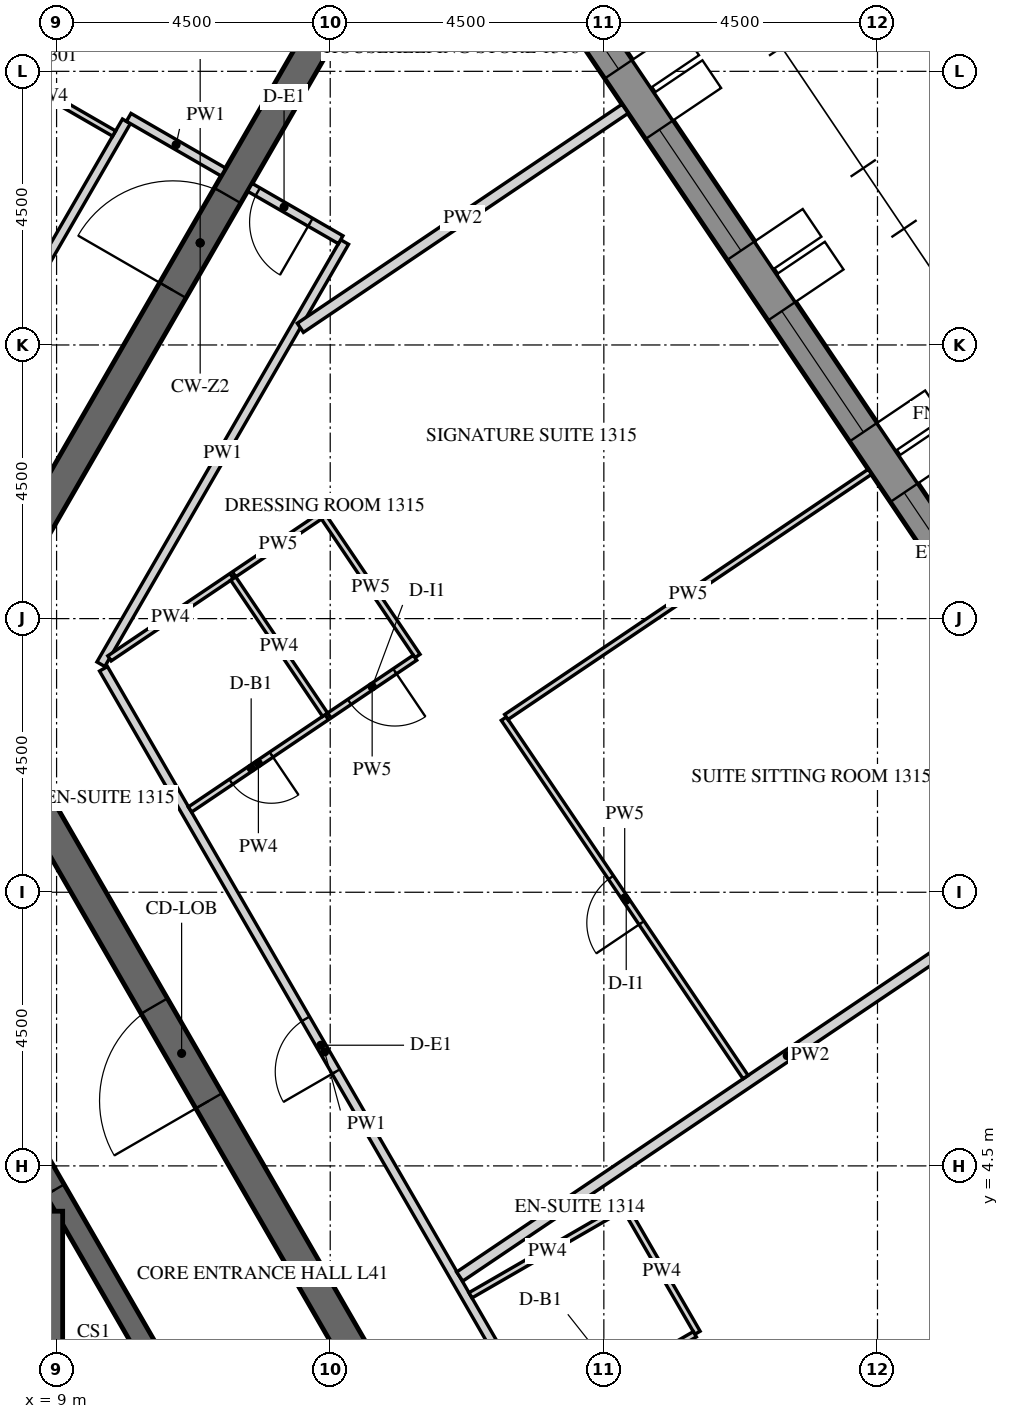
"""IFC4 building model, lengths in metres.
Left out: names, types, materials, properties, quantities, classifications, styles, units other than length and angle.
Written with IfcOpenShell. Run it as: python <this file> out.ifc"""

import sys

from ifc_helpers import new_model, si_unit, direction, frame, frame_2d, origin, place, context, subcontext, project, spatial, polyline, rectangle, outline, extrude, element, fill, save


model = new_model("IFC4")
c1 = context("Model", 3, precision=1e-05, world=origin(), true_north=direction((0.0, 1.0)))
c2 = subcontext(c1, "Body", "Model", "MODEL_VIEW")
j1 = project(units=[si_unit("LENGTHUNIT", "METRE"), si_unit("PLANEANGLEUNIT", "RADIAN")], contexts=[c1])
p1 = place(None, origin())
s1 = spatial("IfcSite", under=j1, at=p1, CompositionType="ELEMENT")
p2 = place(p1, origin())
s2 = spatial("IfcBuilding", under=s1, at=p2, CompositionType="ELEMENT")
p3 = place(p2, frame((0.0, 0.0, 176.1)))
s3 = spatial("IfcBuildingStorey", under=s2, at=p3, CompositionType="ELEMENT", Elevation=176.1)
p4 = place(p3, frame((31.371, 3.071, -0.15), z_axis=(0.0, 0.0, 1.0), x_axis=(-0.559189891278, 0.829039604297, 0.0)))
e1 = element("IfcWall", 1, at=p4, inside=s3, PredefinedType="SOLIDWALL", context=c2, shape_type="SweptSolid", body=[
    extrude(outline(polyline([(-0.026, -0.275), (27.781, -0.275), (27.736, 0.275), (0.026, 0.275), (-0.026, -0.275)])), origin(), (0.0, 0.0, 1.0), 3.9),
])
p5 = place(p4, frame((1.879, 0.0, 1.05)))
e2 = element("IfcOpeningElement", 2, at=p5, cuts=e1, PredefinedType="OPENING", context=c2, shape_type="SweptSolid", body=[
    extrude(rectangle(XDim=2.4, YDim=2.4, at=frame_2d((1.2, 1.2))), frame((0.0, 0.285, 0.0), z_axis=(0.0, -1.0, 0.0), x_axis=(1.0, 0.0, 0.0)), (0.0, 0.0, 1.0), 0.57),
])
p6 = place(p4, frame((5.479, 0.0, 1.05)))
e3 = element("IfcOpeningElement", 3, at=p6, cuts=e1, PredefinedType="OPENING", context=c2, shape_type="SweptSolid", body=[
    extrude(rectangle(XDim=2.4, YDim=2.4, at=frame_2d((1.2, 1.2))), frame((0.0, 0.285, 0.0), z_axis=(0.0, -1.0, 0.0), x_axis=(1.0, 0.0, 0.0)), (0.0, 0.0, 1.0), 0.57),
])
p7 = place(p4, frame((9.079, 0.0, 1.05)))
e4 = element("IfcOpeningElement", 4, at=p7, cuts=e1, PredefinedType="OPENING", context=c2, shape_type="SweptSolid", body=[
    extrude(rectangle(XDim=2.4, YDim=2.4, at=frame_2d((1.2, 1.2))), frame((0.0, 0.285, 0.0), z_axis=(0.0, -1.0, 0.0), x_axis=(1.0, 0.0, 0.0)), (0.0, 0.0, 1.0), 0.57),
])
p8 = place(p4, frame((12.679, 0.0, 1.05)))
e5 = element("IfcOpeningElement", 5, at=p8, cuts=e1, PredefinedType="OPENING", context=c2, shape_type="SweptSolid", body=[
    extrude(rectangle(XDim=2.4, YDim=2.4, at=frame_2d((1.2, 1.2))), frame((0.0, 0.285, 0.0), z_axis=(0.0, -1.0, 0.0), x_axis=(1.0, 0.0, 0.0)), (0.0, 0.0, 1.0), 0.57),
])
p9 = place(p4, frame((16.279, 0.0, 1.05)))
e6 = element("IfcOpeningElement", 6, at=p9, cuts=e1, PredefinedType="OPENING", context=c2, shape_type="SweptSolid", body=[
    extrude(rectangle(XDim=2.4, YDim=2.4, at=frame_2d((1.2, 1.2))), frame((0.0, 0.285, 0.0), z_axis=(0.0, -1.0, 0.0), x_axis=(1.0, 0.0, 0.0)), (0.0, 0.0, 1.0), 0.57),
])
p10 = place(p4, frame((19.879, 0.0, 1.05)))
e7 = element("IfcOpeningElement", 7, at=p10, cuts=e1, PredefinedType="OPENING", context=c2, shape_type="SweptSolid", body=[
    extrude(rectangle(XDim=2.4, YDim=2.4, at=frame_2d((1.2, 1.2))), frame((0.0, 0.285, 0.0), z_axis=(0.0, -1.0, 0.0), x_axis=(1.0, 0.0, 0.0)), (0.0, 0.0, 1.0), 0.57),
])
p11 = place(p4, frame((23.479, 0.0, 1.05)))
e8 = element("IfcOpeningElement", 8, at=p11, cuts=e1, PredefinedType="OPENING", context=c2, shape_type="SweptSolid", body=[
    extrude(rectangle(XDim=2.4, YDim=2.4, at=frame_2d((1.2, 1.2))), frame((0.0, 0.285, 0.0), z_axis=(0.0, -1.0, 0.0), x_axis=(1.0, 0.0, 0.0)), (0.0, 0.0, 1.0), 0.57),
])
p12 = place(p3, frame((14.722, 0.0, -0.15), z_axis=(0.0, 0.0, 1.0), x_axis=(-0.50000571537, 0.866022103989, 0.0)))
e9 = element("IfcWall", 9, at=p12, inside=s3, PredefinedType="SHEAR", context=c2, shape_type="SweptSolid", body=[
    extrude(outline(polyline([(-0.144, -0.25), (14.867, -0.25), (14.578, 0.25), (0.144, 0.25), (-0.144, -0.25)])), origin(), (0.0, 0.0, 1.0), 3.9),
])
p13 = place(p12, frame((6.432, 0.0, 0.15)))
e10 = element("IfcOpeningElement", 10, at=p13, cuts=e9, PredefinedType="OPENING", context=c2, shape_type="SweptSolid", body=[
    extrude(rectangle(XDim=1.8, YDim=2.4, at=frame_2d((0.9, 1.2))), frame((0.0, 0.26, 0.0), z_axis=(0.0, -1.0, 0.0), x_axis=(1.0, 0.0, 0.0)), (0.0, 0.0, 1.0), 0.52),
])
p14 = place(p3, frame((7.506, 13.0, -0.15), z_axis=(0.0, 0.0, 1.0), x_axis=(0.499988271576, 0.866032175087, 0.0)))
e11 = element("IfcWall", 11, at=p14, inside=s3, PredefinedType="SHEAR", context=c2, shape_type="SweptSolid", body=[
    extrude(rectangle(XDim=15.424, YDim=0.5, at=frame_2d((7.712, 0.0))), origin(), (0.0, 0.0, 1.0), 3.9),
])
p15 = place(p14, frame((6.812, 0.0, 0.15)))
e12 = element("IfcOpeningElement", 12, at=p15, cuts=e11, PredefinedType="OPENING", context=c2, shape_type="SweptSolid", body=[
    extrude(rectangle(XDim=1.8, YDim=2.4, at=frame_2d((0.9, 1.2))), frame((0.0, 0.26, 0.0), z_axis=(0.0, -1.0, 0.0), x_axis=(1.0, 0.0, 0.0)), (0.0, 0.0, 1.0), 0.52),
])
p16 = place(p3, frame((11.345, 0.0, -0.15), z_axis=(0.0, 0.0, 1.0), x_axis=(-0.499995046907, 0.866028263435, 0.0)))
e13 = element("IfcWall", 13, at=p16, inside=s3, PredefinedType="SHEAR", context=c2, shape_type="SweptSolid", body=[
    extrude(outline(polyline([(-0.101, -0.175), (11.446, -0.175), (11.244, 0.175), (0.101, 0.175), (-0.101, -0.175)])), origin(), (0.0, 0.0, 1.0), 3.9),
])
p17 = place(p16, frame((4.744, 0.0, 0.15)))
e14 = element("IfcOpeningElement", 14, at=p17, cuts=e13, PredefinedType="OPENING", context=c2, shape_type="SweptSolid", body=[
    extrude(rectangle(XDim=1.8, YDim=2.4, at=frame_2d((0.9, 1.2))), frame((0.0, 0.185, 0.0), z_axis=(0.0, -1.0, 0.0), x_axis=(1.0, 0.0, 0.0)), (0.0, 0.0, 1.0), 0.37),
])
p18 = place(p3, frame((8.975, -3.755, -0.25), z_axis=(0.0, 0.0, 1.0), x_axis=(0.0, 1.0, 0.0)))
e15 = element("IfcWall", 15, at=p18, inside=s3, PredefinedType="SHEAR", context=c2, shape_type="SweptSolid", body=[
    extrude(rectangle(XDim=7.51, YDim=0.25, at=frame_2d((3.755, 0.0))), origin(), (0.0, 0.0, 1.0), 3.9),
])
p19 = place(p3, frame((10.149, 21.678, 0.0), z_axis=(0.0, 0.0, 1.0), x_axis=(-0.499997422768, -0.866026891745, 0.0)))
e16 = element("IfcWall", 16, at=p19, inside=s3, PredefinedType="PARTITIONING", context=c2, shape_type="SweptSolid", body=[
    extrude(rectangle(XDim=7.942, YDim=0.15, at=frame_2d((3.971, 0.0))), origin(), (0.0, 0.0, 1.0), 2.988),
])
p20 = place(p19, frame((4.733, 0.0, 0.0)))
e17 = element("IfcOpeningElement", 17, at=p20, cuts=e16, PredefinedType="OPENING", context=c2, shape_type="SweptSolid", body=[
    extrude(rectangle(XDim=1.0, YDim=2.1, at=frame_2d((0.5, 1.05))), frame((0.0, 0.085, 0.0), z_axis=(0.0, -1.0, 0.0), x_axis=(1.0, 0.0, 0.0)), (0.0, 0.0, 1.0), 0.17),
])
p21 = place(p3, frame((11.745, 20.843, 0.0), z_axis=(0.0, 0.0, 1.0), x_axis=(-0.865989075817, 0.500062916607, 0.0)))
e18 = element("IfcWall", 18, at=p21, inside=s3, PredefinedType="PARTITIONING", context=c2, shape_type="SweptSolid", body=[
    extrude(rectangle(XDim=1.8, YDim=0.15, at=frame_2d((0.9, 0.0))), origin(), (0.0, 0.0, 1.0), 2.988),
])
p22 = place(p3, frame((17.046, 0.075, 0.0), z_axis=(0.0, 0.0, 1.0), x_axis=(-0.499999403554, 0.866025748143, 0.0)))
e19 = element("IfcWall", 19, at=p22, inside=s3, PredefinedType="PARTITIONING", context=c2, shape_type="SweptSolid", body=[
    extrude(rectangle(XDim=14.549, YDim=0.15, at=frame_2d((7.275, 0.0))), origin(), (0.0, 0.0, 1.0), 2.988),
])
p23 = place(p22, frame((6.901, 0.0, 0.0)))
e20 = element("IfcOpeningElement", 20, at=p23, cuts=e19, PredefinedType="OPENING", context=c2, shape_type="SweptSolid", body=[
    extrude(rectangle(XDim=1.0, YDim=2.1, at=frame_2d((0.5, 1.05))), frame((0.0, 0.085, 0.0), z_axis=(0.0, -1.0, 0.0), x_axis=(1.0, 0.0, 0.0)), (0.0, 0.0, 1.0), 0.17),
])
p24 = place(p3, frame((9.728, 12.75, 0.0), z_axis=(0.0, 0.0, 1.0), x_axis=(0.500007149838, 0.866021275784, 0.0)))
e21 = element("IfcWall", 21, at=p24, inside=s3, PredefinedType="PARTITIONING", context=c2, shape_type="SweptSolid", body=[
    extrude(rectangle(XDim=8.017, YDim=0.15, at=frame_2d((4.009, 0.0))), origin(), (0.0, 0.0, 1.0), 2.988),
])
p25 = place(p3, frame((13.672, 19.73, 0.0), z_axis=(0.0, 0.0, 1.0), x_axis=(-0.866074815912, 0.499914405916, 0.0)))
e22 = element("IfcWall", 22, at=p25, inside=s3, PredefinedType="PARTITIONING", context=c2, shape_type="SweptSolid", body=[
    extrude(rectangle(XDim=1.725, YDim=0.15, at=frame_2d((0.862, 0.0))), origin(), (0.0, 0.0, 1.0), 2.988),
])
p26 = place(p25, frame((0.575, 0.0, 0.0)))
e23 = element("IfcOpeningElement", 23, at=p26, cuts=e22, PredefinedType="OPENING", context=c2, shape_type="SweptSolid", body=[
    extrude(rectangle(XDim=1.0, YDim=2.1, at=frame_2d((0.5, 1.05))), frame((0.0, 0.085, 0.0), z_axis=(0.0, -1.0, 0.0), x_axis=(1.0, 0.0, 0.0)), (0.0, 0.0, 1.0), 0.17),
])
p27 = place(p3, frame((7.803, 22.715, 0.0), z_axis=(0.0, 0.0, 1.0), x_axis=(0.866006523861, -0.500032699561, 0.0)))
e24 = element("IfcWall", 24, at=p27, inside=s3, PredefinedType="PARTITIONING", context=c2, shape_type="SweptSolid", body=[
    extrude(rectangle(XDim=2.475, YDim=0.1, at=frame_2d((1.237, 0.0))), origin(), (0.0, 0.0, 1.0), 2.988),
])
p28 = place(p3, frame((15.807, 2.372, 0.0), z_axis=(0.0, 0.0, 1.0), x_axis=(0.86601045545, 0.500025890382, 0.0)))
e25 = element("IfcWall", 25, at=p28, inside=s3, PredefinedType="PARTITIONING", context=c2, shape_type="SweptSolid", body=[
    extrude(rectangle(XDim=2.925, YDim=0.1, at=frame_2d((1.462, 0.0))), origin(), (0.0, 0.0, 1.0), 2.988),
])
p29 = place(p3, frame((18.365, 3.791, 0.0), z_axis=(0.0, 0.0, 1.0), x_axis=(0.500016218704, -0.866016039709, 0.0)))
e26 = element("IfcWall", 26, at=p29, inside=s3, PredefinedType="PARTITIONING", context=c2, shape_type="SweptSolid", body=[
    extrude(rectangle(XDim=2.35, YDim=0.1, at=frame_2d((1.175, 0.0))), origin(), (0.0, 0.0, 1.0), 2.988),
])
p30 = place(p3, frame((19.496, 1.731, 0.0), z_axis=(0.0, 0.0, 1.0), x_axis=(-0.866018712932, -0.500011588718, 0.0)))
e27 = element("IfcWall", 27, at=p30, inside=s3, PredefinedType="PARTITIONING", context=c2, shape_type="SweptSolid", body=[
    extrude(rectangle(XDim=2.875, YDim=0.1, at=frame_2d((1.438, 0.0))), origin(), (0.0, 0.0, 1.0), 2.988),
])
p31 = place(p30, frame((1.05, 0.0, 0.0)))
e28 = element("IfcOpeningElement", 28, at=p31, cuts=e27, PredefinedType="OPENING", context=c2, shape_type="SweptSolid", body=[
    extrude(rectangle(XDim=0.8, YDim=2.1, at=frame_2d((0.4, 1.05))), frame((0.0, 0.06, 0.0), z_axis=(0.0, -1.0, 0.0), x_axis=(1.0, 0.0, 0.0)), (0.0, 0.0, 1.0), 0.12),
])
p32 = place(p3, frame((26.402, 9.946, 0.0), z_axis=(0.0, 0.0, 1.0), x_axis=(-0.829032022697, -0.559201131386, 0.0)))
e29 = element("IfcWall", 29, at=p32, inside=s3, PredefinedType="PARTITIONING", context=c2, shape_type="SweptSolid", body=[
    extrude(rectangle(XDim=12.995, YDim=0.18, at=frame_2d((6.497, 0.0))), origin(), (0.0, 0.0, 1.0), 2.988),
])
p33 = place(p3, frame((9.87, 12.846, 0.0), z_axis=(0.0, 0.0, 1.0), x_axis=(0.829044958406, 0.559181953341, 0.0)))
e30 = element("IfcWall", 30, at=p33, inside=s3, PredefinedType="PARTITIONING", context=c2, shape_type="SweptSolid", body=[
    extrude(rectangle(XDim=2.422, YDim=0.1, at=frame_2d((1.211, 0.0))), origin(), (0.0, 0.0, 1.0), 2.988),
])
p34 = place(p3, frame((13.444, 11.878, 0.0), z_axis=(0.0, 0.0, 1.0), x_axis=(-0.829076008986, -0.559135914894, 0.0)))
e31 = element("IfcWall", 31, at=p34, inside=s3, PredefinedType="PARTITIONING", context=c2, shape_type="SweptSolid", body=[
    extrude(rectangle(XDim=2.713, YDim=0.1, at=frame_2d((1.357, 0.0))), origin(), (0.0, 0.0, 1.0), 2.988),
])
p35 = place(p34, frame((1.1, 0.0, 0.0)))
e32 = element("IfcOpeningElement", 32, at=p35, cuts=e31, PredefinedType="OPENING", context=c2, shape_type="SweptSolid", body=[
    extrude(rectangle(XDim=0.8, YDim=2.1, at=frame_2d((0.4, 1.05))), frame((0.0, 0.06, 0.0), z_axis=(0.0, -1.0, 0.0), x_axis=(1.0, 0.0, 0.0)), (0.0, 0.0, 1.0), 0.12),
])
p36 = place(p3, frame((11.919, 14.228, 0.0), z_axis=(0.0, 0.0, 1.0), x_axis=(0.829076640662, 0.559134978256, 0.0)))
e33 = element("IfcWall", 33, at=p36, inside=s3, PredefinedType="PARTITIONING", context=c2, shape_type="SweptSolid", body=[
    extrude(rectangle(XDim=1.75, YDim=0.1, at=frame_2d((0.875, 0.0))), origin(), (0.0, 0.0, 1.0), 2.988),
])
p37 = place(p3, frame((13.398, 15.165, 0.0), z_axis=(0.0, 0.0, 1.0), x_axis=(0.559178562802, -0.829047245278, 0.0)))
e34 = element("IfcWall", 34, at=p37, inside=s3, PredefinedType="PARTITIONING", context=c2, shape_type="SweptSolid", body=[
    extrude(rectangle(XDim=2.75, YDim=0.1, at=frame_2d((1.375, 0.0))), origin(), (0.0, 0.0, 1.0), 2.988),
])
p38 = place(p3, frame((14.894, 12.857, 0.0), z_axis=(0.0, 0.0, 1.0), x_axis=(-0.828988508894, -0.559265636457, 0.0)))
e35 = element("IfcWall", 35, at=p38, inside=s3, PredefinedType="PARTITIONING", context=c2, shape_type="SweptSolid", body=[
    extrude(rectangle(XDim=1.7, YDim=0.1, at=frame_2d((0.85, 0.0))), origin(), (0.0, 0.0, 1.0), 2.988),
])
p39 = place(p38, frame((0.4, 0.0, 0.0)))
e36 = element("IfcOpeningElement", 36, at=p39, cuts=e35, PredefinedType="OPENING", context=c2, shape_type="SweptSolid", body=[
    extrude(rectangle(XDim=0.9, YDim=2.1, at=frame_2d((0.45, 1.05))), frame((0.0, 0.06, 0.0), z_axis=(0.0, -1.0, 0.0), x_axis=(1.0, 0.0, 0.0)), (0.0, 0.0, 1.0), 0.12),
])
p40 = place(p3, frame((20.331, 5.96, 0.0), z_axis=(0.0, 0.0, 1.0), x_axis=(-0.559185029686, 0.829042883435, 0.0)))
e37 = element("IfcWall", 37, at=p40, inside=s3, PredefinedType="PARTITIONING", context=c2, shape_type="SweptSolid", body=[
    extrude(rectangle(XDim=7.11, YDim=0.1, at=frame_2d((3.555, 0.0))), origin(), (0.0, 0.0, 1.0), 2.988),
])
p41 = place(p40, frame((3.06, 0.0, 0.0)))
e38 = element("IfcOpeningElement", 38, at=p41, cuts=e37, PredefinedType="OPENING", context=c2, shape_type="SweptSolid", body=[
    extrude(rectangle(XDim=0.9, YDim=2.1, at=frame_2d((0.45, 1.05))), frame((0.0, 0.06, 0.0), z_axis=(0.0, -1.0, 0.0), x_axis=(1.0, 0.0, 0.0)), (0.0, 0.0, 1.0), 0.12),
])
p42 = place(p3, frame((16.396, 11.882, 0.0), z_axis=(0.0, 0.0, 1.0), x_axis=(0.829038554805, 0.559191447223, 0.0)))
e39 = element("IfcWall", 39, at=p42, inside=s3, PredefinedType="PARTITIONING", context=c2, shape_type="SweptSolid", body=[
    extrude(rectangle(XDim=7.213, YDim=0.1, at=frame_2d((3.606, 0.0))), origin(), (0.0, 0.0, 1.0), 2.988),
])
p43 = place(p3, frame((18.35, 21.884, 0.0), z_axis=(0.0, 0.0, 1.0), x_axis=(-0.829047205772, -0.559178621374, 0.0)))
e40 = element("IfcWall", 40, at=p43, inside=s3, PredefinedType="PARTITIONING", context=c2, shape_type="SweptSolid", body=[
    extrude(rectangle(XDim=6.442, YDim=0.18, at=frame_2d((3.221, 0.0))), origin(), (0.0, 0.0, 1.0), 2.988),
])
p44 = place(p3, frame((13.416, 11.92, 0.0), z_axis=(0.0, 0.0, 1.0), x_axis=(-0.559157567313, 0.829061405999, 0.0)))
e41 = element("IfcWall", 41, at=p44, inside=s3, PredefinedType="PARTITIONING", context=c2, shape_type="SweptSolid", body=[
    extrude(rectangle(XDim=2.7, YDim=0.1, at=frame_2d((1.35, 0.0))), origin(), (0.0, 0.0, 1.0), 2.988),
])
p45 = place(p8, frame((0.0, 0.205, 0.0)))
e42 = element("IfcWindow", 42, at=p45, inside=s3, PartitioningType="DOUBLE_PANEL_VERTICAL", PredefinedType="WINDOW", context=c2, shape_type="SweptSolid", body=[
    extrude(rectangle(XDim=2.4, YDim=2.4, at=frame_2d((1.2, 1.2))), frame((0.0, 0.03, 0.0), z_axis=(0.0, -1.0, 0.0), x_axis=(1.0, 0.0, 0.0)), (0.0, 0.0, 1.0), 0.06),
])
fill(e5, e42)
p46 = place(p9, frame((0.0, 0.205, 0.0)))
e43 = element("IfcWindow", 43, at=p46, inside=s3, PartitioningType="DOUBLE_PANEL_VERTICAL", PredefinedType="WINDOW", context=c2, shape_type="SweptSolid", body=[
    extrude(rectangle(XDim=2.4, YDim=2.4, at=frame_2d((1.2, 1.2))), frame((0.0, 0.03, 0.0), z_axis=(0.0, -1.0, 0.0), x_axis=(1.0, 0.0, 0.0)), (0.0, 0.0, 1.0), 0.06),
])
fill(e6, e43)
p47 = place(p10, frame((0.0, 0.205, 0.0)))
e44 = element("IfcWindow", 44, at=p47, inside=s3, PartitioningType="DOUBLE_PANEL_VERTICAL", PredefinedType="WINDOW", context=c2, shape_type="SweptSolid", body=[
    extrude(rectangle(XDim=2.4, YDim=2.4, at=frame_2d((1.2, 1.2))), frame((0.0, 0.03, 0.0), z_axis=(0.0, -1.0, 0.0), x_axis=(1.0, 0.0, 0.0)), (0.0, 0.0, 1.0), 0.06),
])
fill(e7, e44)
p48 = place(p11, frame((0.0, 0.205, 0.0)))
e45 = element("IfcWindow", 45, at=p48, inside=s3, PartitioningType="DOUBLE_PANEL_VERTICAL", PredefinedType="WINDOW", context=c2, shape_type="SweptSolid", body=[
    extrude(rectangle(XDim=2.4, YDim=2.4, at=frame_2d((1.2, 1.2))), frame((0.0, 0.03, 0.0), z_axis=(0.0, -1.0, 0.0), x_axis=(1.0, 0.0, 0.0)), (0.0, 0.0, 1.0), 0.06),
])
fill(e8, e45)
p49 = place(p13, origin())
e46 = element("IfcDoor", 46, at=p49, inside=s3, OperationType="DOUBLE_DOOR_SINGLE_SWING", PredefinedType="DOOR", context=c2, shape_type="SweptSolid", body=[
    extrude(rectangle(XDim=1.8, YDim=2.4, at=frame_2d((0.9, 1.2))), frame((0.0, 0.025, 0.0), z_axis=(0.0, -1.0, 0.0), x_axis=(1.0, 0.0, 0.0)), (0.0, 0.0, 1.0), 0.05),
])
fill(e10, e46)
p50 = place(p15, origin())
e47 = element("IfcDoor", 47, at=p50, inside=s3, OperationType="DOUBLE_DOOR_SINGLE_SWING", PredefinedType="DOOR", context=c2, shape_type="SweptSolid", body=[
    extrude(rectangle(XDim=1.8, YDim=2.4, at=frame_2d((0.9, 1.2))), frame((0.0, 0.025, 0.0), z_axis=(0.0, -1.0, 0.0), x_axis=(1.0, 0.0, 0.0)), (0.0, 0.0, 1.0), 0.05),
])
fill(e12, e47)
p51 = place(p17, origin())
e48 = element("IfcDoor", 48, at=p51, inside=s3, OperationType="DOUBLE_DOOR_SINGLE_SWING", PredefinedType="DOOR", context=c2, shape_type="SweptSolid", body=[
    extrude(rectangle(XDim=1.8, YDim=2.4, at=frame_2d((0.9, 1.2))), frame((0.0, 0.025, 0.0), z_axis=(0.0, -1.0, 0.0), x_axis=(1.0, 0.0, 0.0)), (0.0, 0.0, 1.0), 0.05),
])
fill(e14, e48)
p52 = place(p23, origin())
e49 = element("IfcDoor", 49, at=p52, inside=s3, OperationType="SINGLE_SWING_RIGHT", PredefinedType="DOOR", context=c2, shape_type="SweptSolid", body=[
    extrude(rectangle(XDim=1.0, YDim=2.1, at=frame_2d((0.5, 1.05))), frame((0.0, 0.025, 0.0), z_axis=(0.0, -1.0, 0.0), x_axis=(1.0, 0.0, 0.0)), (0.0, 0.0, 1.0), 0.05),
])
fill(e20, e49)
p53 = place(p35, origin())
e50 = element("IfcDoor", 50, at=p53, inside=s3, OperationType="SINGLE_SWING_LEFT", PredefinedType="DOOR", context=c2, shape_type="SweptSolid", body=[
    extrude(rectangle(XDim=0.8, YDim=2.1, at=frame_2d((0.4, 1.05))), frame((0.0, 0.025, 0.0), z_axis=(0.0, -1.0, 0.0), x_axis=(1.0, 0.0, 0.0)), (0.0, 0.0, 1.0), 0.05),
])
fill(e32, e50)
p54 = place(p39, origin())
e51 = element("IfcDoor", 51, at=p54, inside=s3, OperationType="SINGLE_SWING_RIGHT", PredefinedType="DOOR", context=c2, shape_type="SweptSolid", body=[
    extrude(rectangle(XDim=0.9, YDim=2.1, at=frame_2d((0.45, 1.05))), frame((0.0, 0.025, 0.0), z_axis=(0.0, -1.0, 0.0), x_axis=(1.0, 0.0, 0.0)), (0.0, 0.0, 1.0), 0.05),
])
fill(e36, e51)
p55 = place(p41, origin())
e52 = element("IfcDoor", 52, at=p55, inside=s3, OperationType="SINGLE_SWING_RIGHT", PredefinedType="DOOR", context=c2, shape_type="SweptSolid", body=[
    extrude(rectangle(XDim=0.9, YDim=2.1, at=frame_2d((0.45, 1.05))), frame((0.0, 0.025, 0.0), z_axis=(0.0, -1.0, 0.0), x_axis=(1.0, 0.0, 0.0)), (0.0, 0.0, 1.0), 0.05),
])
fill(e38, e52)
p56 = place(p26, origin())
e53 = element("IfcDoor", 53, at=p56, inside=s3, OperationType="SINGLE_SWING_LEFT", PredefinedType="DOOR", context=c2, shape_type="SweptSolid", body=[
    extrude(rectangle(XDim=1.0, YDim=2.1, at=frame_2d((0.5, 1.05))), frame((0.0, 0.025, 0.0), z_axis=(0.0, -1.0, 0.0), x_axis=(1.0, 0.0, 0.0)), (0.0, 0.0, 1.0), 0.05),
])
fill(e23, e53)
save(model, sys.argv[1])
